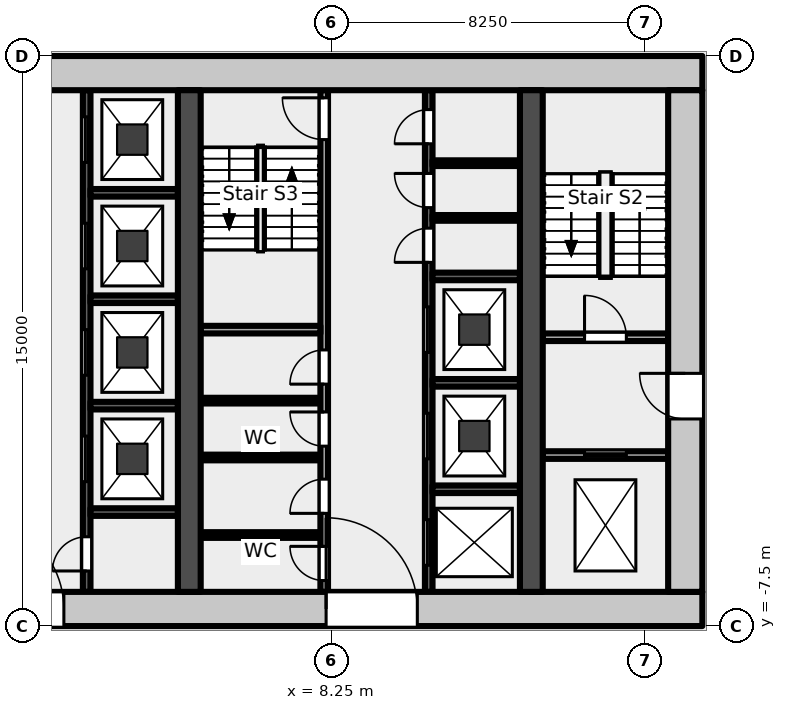
"""IFC4 building model, lengths in metres.
Left out: names, types, materials, properties, quantities, classifications, styles, units other than length and angle.
Written with IfcOpenShell. Run it as: python <this file> out.ifc"""

import sys

from ifc_helpers import new_model, si_unit, direction, frame, frame_2d, origin, place, context, subcontext, project, spatial, rectangle, extrude, element, fill, save


model = new_model("IFC4")
c1 = context("Model", 3, precision=1e-05, world=origin(), true_north=direction((0.0, 1.0)))
c2 = subcontext(c1, "Body", "Model", "MODEL_VIEW")
j1 = project(units=[si_unit("LENGTHUNIT", "METRE"), si_unit("PLANEANGLEUNIT", "RADIAN")], contexts=[c1])
p1 = place(None, origin())
s1 = spatial("IfcSite", under=j1, at=p1, CompositionType="ELEMENT")
p2 = place(p1, origin())
s2 = spatial("IfcBuilding", under=s1, at=p2, CompositionType="ELEMENT")
p3 = place(p2, origin())
s3 = spatial("IfcBuildingStorey", under=s2, at=p3, CompositionType="ELEMENT", Elevation=0.0)
p4 = place(p3, frame((-18.0, -7.05, -0.2), z_axis=(0.0, 0.0, 1.0), x_axis=(1.0, 0.0, 0.0)))
e1 = element("IfcWall", 1, at=p4, inside=s3, PredefinedType="SHEAR", context=c2, shape_type="SweptSolid", body=[
    extrude(rectangle(XDim=36.0, YDim=0.9, at=frame_2d((18.0, 0.0))), origin(), (0.0, 0.0, 1.0), 7.2),
])
p5 = place(p4, frame((7.8, 0.0, 0.2)))
e2 = element("IfcOpeningElement", 2, at=p5, cuts=e1, PredefinedType="OPENING", context=c2, shape_type="SweptSolid", body=[
    extrude(rectangle(XDim=2.4, YDim=2.1, at=frame_2d((1.2, 1.05))), frame((0.0, 0.46, 0.0), z_axis=(0.0, -1.0, 0.0), x_axis=(1.0, 0.0, 0.0)), (0.0, 0.0, 1.0), 0.921),
])
p6 = place(p4, frame((16.8, 0.0, 0.2)))
e3 = element("IfcOpeningElement", 3, at=p6, cuts=e1, PredefinedType="OPENING", context=c2, shape_type="SweptSolid", body=[
    extrude(rectangle(XDim=2.4, YDim=2.1, at=frame_2d((1.2, 1.05))), frame((0.0, 0.46, 0.0), z_axis=(0.0, -1.0, 0.0), x_axis=(1.0, 0.0, 0.0)), (0.0, 0.0, 1.0), 0.921),
])
p7 = place(p4, frame((26.1, 0.0, 0.2)))
e4 = element("IfcOpeningElement", 4, at=p7, cuts=e1, PredefinedType="OPENING", context=c2, shape_type="SweptSolid", body=[
    extrude(rectangle(XDim=2.4, YDim=2.1, at=frame_2d((1.2, 1.05))), frame((0.0, 0.46, 0.0), z_axis=(0.0, -1.0, 0.0), x_axis=(1.0, 0.0, 0.0)), (0.0, 0.0, 1.0), 0.921),
])
p8 = place(p3, frame((-18.0, 7.05, -0.2), z_axis=(0.0, 0.0, 1.0), x_axis=(1.0, 0.0, 0.0)))
e5 = element("IfcWall", 5, at=p8, inside=s3, PredefinedType="SHEAR", context=c2, shape_type="SweptSolid", body=[
    extrude(rectangle(XDim=36.0, YDim=0.9, at=frame_2d((18.0, 0.0))), origin(), (0.0, 0.0, 1.0), 7.2),
])
p9 = place(p3, frame((17.55, -6.6, -0.2), z_axis=(0.0, 0.0, 1.0), x_axis=(0.0, 1.0, 0.0)))
e6 = element("IfcWall", 6, at=p9, inside=s3, PredefinedType="SHEAR", context=c2, shape_type="SweptSolid", body=[
    extrude(rectangle(XDim=13.2, YDim=0.9, at=frame_2d((6.6, 0.0))), origin(), (0.0, 0.0, 1.0), 7.2),
])
p10 = place(p9, frame((4.55, 0.0, 0.2)))
e7 = element("IfcOpeningElement", 7, at=p10, cuts=e6, PredefinedType="OPENING", context=c2, shape_type="SweptSolid", body=[
    extrude(rectangle(XDim=1.2, YDim=2.1, at=frame_2d((0.6, 1.05))), frame((0.0, 0.46, 0.0), z_axis=(0.0, -1.0, 0.0), x_axis=(1.0, 0.0, 0.0)), (0.0, 0.0, 1.0), 0.921),
])
for number, where, z_axis, x_axis in (
    (8, (4.5, -6.6, -0.2), (0.0, 0.0, 1.0), (0.0, 1.0, 0.0)),
    (9, (13.5, -6.6, -0.2), (0.0, 0.0, 1.0), (0.0, 1.0, 0.0)),
):
    element("IfcWall", number, at=place(p3, frame(where, z_axis=z_axis, x_axis=x_axis)), inside=s3, PredefinedType="SHEAR", context=c2, shape_type="SweptSolid", body=[
        extrude(rectangle(XDim=13.2, YDim=0.6, at=frame_2d((6.6, 0.0))), origin(), (0.0, 0.0, 1.0), 7.2),
    ])
p11 = place(p3, frame((13.8, -3.0, 0.0), z_axis=(0.0, 0.0, 1.0), x_axis=(1.0, 0.0, 0.0)))
e10 = element("IfcWall", 10, at=p11, inside=s3, PredefinedType="PARTITIONING", context=c2, shape_type="SweptSolid", body=[
    extrude(rectangle(XDim=3.3, YDim=0.2, at=frame_2d((1.65, 0.0))), origin(), (0.0, 0.0, 1.0), 7.0),
])
p12 = place(p11, frame((1.1, 0.0, 0.0)))
e11 = element("IfcOpeningElement", 11, at=p12, cuts=e10, PredefinedType="OPENING", context=c2, shape_type="SweptSolid", body=[
    extrude(rectangle(XDim=1.1, YDim=2.1, at=frame_2d((0.55, 1.05))), frame((0.0, 0.111, 0.0), z_axis=(0.0, -1.0, 0.0), x_axis=(1.0, 0.0, 0.0)), (0.0, 0.0, 1.0), 0.221),
])
p13 = place(p3, frame((13.8, 0.1, 0.0), z_axis=(0.0, 0.0, 1.0), x_axis=(1.0, 0.0, 0.0)))
e12 = element("IfcWall", 12, at=p13, inside=s3, PredefinedType="PARTITIONING", context=c2, shape_type="SweptSolid", body=[
    extrude(rectangle(XDim=3.3, YDim=0.2, at=frame_2d((1.65, 0.0))), origin(), (0.0, 0.0, 1.0), 7.0),
])
p14 = place(p13, frame((1.1, 0.0, 0.0)))
e13 = element("IfcOpeningElement", 13, at=p14, cuts=e12, PredefinedType="OPENING", context=c2, shape_type="SweptSolid", body=[
    extrude(rectangle(XDim=1.1, YDim=2.1, at=frame_2d((0.55, 1.05))), frame((0.0, 0.111, 0.0), z_axis=(0.0, -1.0, 0.0), x_axis=(1.0, 0.0, 0.0)), (0.0, 0.0, 1.0), 0.221),
])
p15 = place(p3, frame((1.8, -6.6, 0.0), z_axis=(0.0, 0.0, 1.0), x_axis=(0.0, 1.0, 0.0)))
e14 = element("IfcWall", 14, at=p15, inside=s3, PredefinedType="PARTITIONING", context=c2, shape_type="SweptSolid", body=[
    extrude(rectangle(XDim=13.2, YDim=0.2, at=frame_2d((6.6, 0.0))), origin(), (0.0, 0.0, 1.0), 7.0),
])
p16 = place(p15, frame((0.55, 0.0, 0.0)))
e15 = element("IfcOpeningElement", 15, at=p16, cuts=e14, PredefinedType="OPENING", context=c2, shape_type="SweptSolid", body=[
    extrude(rectangle(XDim=0.9, YDim=2.1, at=frame_2d((0.45, 1.05))), frame((0.0, 0.111, 0.0), z_axis=(0.0, -1.0, 0.0), x_axis=(1.0, 0.0, 0.0)), (0.0, 0.0, 1.0), 0.221),
])
p17 = place(p15, frame((2.9, 0.0, 0.0)))
e16 = element("IfcOpeningElement", 16, at=p17, cuts=e14, PredefinedType="OPENING", context=c2, shape_type="SweptSolid", body=[
    extrude(rectangle(XDim=1.2, YDim=2.1, at=frame_2d((0.6, 1.05))), frame((0.0, 0.111, 0.0), z_axis=(0.0, -1.0, 0.0), x_axis=(1.0, 0.0, 0.0)), (0.0, 0.0, 1.0), 0.221),
])
p18 = place(p15, frame((5.7, 0.0, 0.0)))
e17 = element("IfcOpeningElement", 17, at=p18, cuts=e14, PredefinedType="OPENING", context=c2, shape_type="SweptSolid", body=[
    extrude(rectangle(XDim=1.2, YDim=2.1, at=frame_2d((0.6, 1.05))), frame((0.0, 0.111, 0.0), z_axis=(0.0, -1.0, 0.0), x_axis=(1.0, 0.0, 0.0)), (0.0, 0.0, 1.0), 0.221),
])
p19 = place(p15, frame((8.5, 0.0, 0.0)))
e18 = element("IfcOpeningElement", 18, at=p19, cuts=e14, PredefinedType="OPENING", context=c2, shape_type="SweptSolid", body=[
    extrude(rectangle(XDim=1.2, YDim=2.1, at=frame_2d((0.6, 1.05))), frame((0.0, 0.111, 0.0), z_axis=(0.0, -1.0, 0.0), x_axis=(1.0, 0.0, 0.0)), (0.0, 0.0, 1.0), 0.221),
])
p20 = place(p15, frame((11.3, 0.0, 0.0)))
e19 = element("IfcOpeningElement", 19, at=p20, cuts=e14, PredefinedType="OPENING", context=c2, shape_type="SweptSolid", body=[
    extrude(rectangle(XDim=1.2, YDim=2.1, at=frame_2d((0.6, 1.05))), frame((0.0, 0.111, 0.0), z_axis=(0.0, -1.0, 0.0), x_axis=(1.0, 0.0, 0.0)), (0.0, 0.0, 1.0), 0.221),
])
for number, where, z_axis, x_axis in (
    (20, (1.9, -1.7, 0.0), (0.0, 0.0, 1.0), (1.0, 0.0, 0.0)),
    (21, (1.9, 1.1, 0.0), (0.0, 0.0, 1.0), (1.0, 0.0, 0.0)),
    (22, (1.9, 3.9, 0.0), (0.0, 0.0, 1.0), (1.0, 0.0, 0.0)),
    (23, (1.9, -4.5, 0.0), (0.0, 0.0, 1.0), (1.0, 0.0, 0.0)),
):
    element("IfcWall", number, at=place(p3, frame(where, z_axis=z_axis, x_axis=x_axis)), inside=s3, PredefinedType="PARTITIONING", context=c2, shape_type="SweptSolid", body=[
        extrude(rectangle(XDim=2.3, YDim=0.2, at=frame_2d((1.15, 0.0))), origin(), (0.0, 0.0, 1.0), 7.0),
    ])
p21 = place(p3, frame((8.05, -6.6, 0.0), z_axis=(0.0, 0.0, 1.0), x_axis=(0.0, 1.0, 0.0)))
e24 = element("IfcWall", 24, at=p21, inside=s3, PredefinedType="PARTITIONING", context=c2, shape_type="SweptSolid", body=[
    extrude(rectangle(XDim=13.2, YDim=0.2, at=frame_2d((6.6, 0.0))), origin(), (0.0, 0.0, 1.0), 7.0),
])
p22 = place(p21, frame((0.298, 0.0, 0.0)))
e25 = element("IfcOpeningElement", 25, at=p22, cuts=e24, PredefinedType="OPENING", context=c2, shape_type="SweptSolid", body=[
    extrude(rectangle(XDim=0.9, YDim=2.1, at=frame_2d((0.45, 1.05))), frame((0.0, 0.111, 0.0), z_axis=(0.0, -1.0, 0.0), x_axis=(1.0, 0.0, 0.0)), (0.0, 0.0, 1.0), 0.221),
])
p23 = place(p21, frame((2.066, 0.0, 0.0)))
e26 = element("IfcOpeningElement", 26, at=p23, cuts=e24, PredefinedType="OPENING", context=c2, shape_type="SweptSolid", body=[
    extrude(rectangle(XDim=0.9, YDim=2.1, at=frame_2d((0.45, 1.05))), frame((0.0, 0.111, 0.0), z_axis=(0.0, -1.0, 0.0), x_axis=(1.0, 0.0, 0.0)), (0.0, 0.0, 1.0), 0.221),
])
p24 = place(p21, frame((3.834, 0.0, 0.0)))
e27 = element("IfcOpeningElement", 27, at=p24, cuts=e24, PredefinedType="OPENING", context=c2, shape_type="SweptSolid", body=[
    extrude(rectangle(XDim=0.9, YDim=2.1, at=frame_2d((0.45, 1.05))), frame((0.0, 0.111, 0.0), z_axis=(0.0, -1.0, 0.0), x_axis=(1.0, 0.0, 0.0)), (0.0, 0.0, 1.0), 0.221),
])
p25 = place(p21, frame((5.466, 0.0, 0.0)))
e28 = element("IfcOpeningElement", 28, at=p25, cuts=e24, PredefinedType="OPENING", context=c2, shape_type="SweptSolid", body=[
    extrude(rectangle(XDim=0.9, YDim=2.1, at=frame_2d((0.45, 1.05))), frame((0.0, 0.111, 0.0), z_axis=(0.0, -1.0, 0.0), x_axis=(1.0, 0.0, 0.0)), (0.0, 0.0, 1.0), 0.221),
])
p26 = place(p21, frame((11.9, 0.0, 0.0)))
e29 = element("IfcOpeningElement", 29, at=p26, cuts=e24, PredefinedType="OPENING", context=c2, shape_type="SweptSolid", body=[
    extrude(rectangle(XDim=1.1, YDim=2.1, at=frame_2d((0.55, 1.05))), frame((0.0, 0.111, 0.0), z_axis=(0.0, -1.0, 0.0), x_axis=(1.0, 0.0, 0.0)), (0.0, 0.0, 1.0), 0.221),
])
p27 = place(p3, frame((10.8, -6.6, 0.0), z_axis=(0.0, 0.0, 1.0), x_axis=(0.0, 1.0, 0.0)))
e30 = element("IfcWall", 30, at=p27, inside=s3, PredefinedType="PARTITIONING", context=c2, shape_type="SweptSolid", body=[
    extrude(rectangle(XDim=13.2, YDim=0.2, at=frame_2d((6.6, 0.0))), origin(), (0.0, 0.0, 1.0), 7.0),
])
p28 = place(p27, frame((0.7, 0.0, 0.0)))
e31 = element("IfcOpeningElement", 31, at=p28, cuts=e30, PredefinedType="OPENING", context=c2, shape_type="SweptSolid", body=[
    extrude(rectangle(XDim=1.2, YDim=2.1, at=frame_2d((0.6, 1.05))), frame((0.0, 0.111, 0.0), z_axis=(0.0, -1.0, 0.0), x_axis=(1.0, 0.0, 0.0)), (0.0, 0.0, 1.0), 0.221),
])
p29 = place(p27, frame((3.5, 0.0, 0.0)))
e32 = element("IfcOpeningElement", 32, at=p29, cuts=e30, PredefinedType="OPENING", context=c2, shape_type="SweptSolid", body=[
    extrude(rectangle(XDim=1.2, YDim=2.1, at=frame_2d((0.6, 1.05))), frame((0.0, 0.111, 0.0), z_axis=(0.0, -1.0, 0.0), x_axis=(1.0, 0.0, 0.0)), (0.0, 0.0, 1.0), 0.221),
])
p30 = place(p27, frame((6.3, 0.0, 0.0)))
e33 = element("IfcOpeningElement", 33, at=p30, cuts=e30, PredefinedType="OPENING", context=c2, shape_type="SweptSolid", body=[
    extrude(rectangle(XDim=1.2, YDim=2.1, at=frame_2d((0.6, 1.05))), frame((0.0, 0.111, 0.0), z_axis=(0.0, -1.0, 0.0), x_axis=(1.0, 0.0, 0.0)), (0.0, 0.0, 1.0), 0.221),
])
p31 = place(p27, frame((8.67, 0.0, 0.0)))
e34 = element("IfcOpeningElement", 34, at=p31, cuts=e30, PredefinedType="OPENING", context=c2, shape_type="SweptSolid", body=[
    extrude(rectangle(XDim=0.9, YDim=2.1, at=frame_2d((0.45, 1.05))), frame((0.0, 0.111, 0.0), z_axis=(0.0, -1.0, 0.0), x_axis=(1.0, 0.0, 0.0)), (0.0, 0.0, 1.0), 0.221),
])
p32 = place(p27, frame((10.11, 0.0, 0.0)))
e35 = element("IfcOpeningElement", 35, at=p32, cuts=e30, PredefinedType="OPENING", context=c2, shape_type="SweptSolid", body=[
    extrude(rectangle(XDim=0.9, YDim=2.1, at=frame_2d((0.45, 1.05))), frame((0.0, 0.111, 0.0), z_axis=(0.0, -1.0, 0.0), x_axis=(1.0, 0.0, 0.0)), (0.0, 0.0, 1.0), 0.221),
])
p33 = place(p27, frame((11.79, 0.0, 0.0)))
e36 = element("IfcOpeningElement", 36, at=p33, cuts=e30, PredefinedType="OPENING", context=c2, shape_type="SweptSolid", body=[
    extrude(rectangle(XDim=0.9, YDim=2.1, at=frame_2d((0.45, 1.05))), frame((0.0, 0.111, 0.0), z_axis=(0.0, -1.0, 0.0), x_axis=(1.0, 0.0, 0.0)), (0.0, 0.0, 1.0), 0.221),
])
p34 = place(p3, frame((4.8, 0.3, 0.0), z_axis=(0.0, 0.0, 1.0), x_axis=(1.0, 0.0, 0.0)))
e37 = element("IfcWall", 37, at=p34, inside=s3, PredefinedType="PARTITIONING", context=c2, shape_type="SweptSolid", body=[
    extrude(rectangle(XDim=3.15, YDim=0.2, at=frame_2d((1.575, 0.0))), origin(), (0.0, 0.0, 1.0), 7.0),
])
for number, where, z_axis, x_axis in (
    (38, (4.8, -5.104, 0.0), (0.0, 0.0, 1.0), (1.0, 0.0, 0.0)),
    (39, (4.8, -3.064, 0.0), (0.0, 0.0, 1.0), (1.0, 0.0, 0.0)),
    (40, (4.8, -1.568, 0.0), (0.0, 0.0, 1.0), (1.0, 0.0, 0.0)),
):
    element("IfcWall", number, at=place(p3, frame(where, z_axis=z_axis, x_axis=x_axis)), inside=s3, PredefinedType="PARTITIONING", context=c2, shape_type="SweptSolid", body=[
        extrude(rectangle(XDim=3.15, YDim=0.15, at=frame_2d((1.575, 0.0))), origin(), (0.0, 0.0, 1.0), 7.0),
    ])
for number, where, z_axis, x_axis in (
    (41, (10.9, -3.9, 0.0), (0.0, 0.0, 1.0), (1.0, 0.0, 0.0)),
    (42, (10.9, -1.1, 0.0), (0.0, 0.0, 1.0), (1.0, 0.0, 0.0)),
    (43, (10.9, 1.7, 0.0), (0.0, 0.0, 1.0), (1.0, 0.0, 0.0)),
):
    element("IfcWall", number, at=place(p3, frame(where, z_axis=z_axis, x_axis=x_axis)), inside=s3, PredefinedType="PARTITIONING", context=c2, shape_type="SweptSolid", body=[
        extrude(rectangle(XDim=2.3, YDim=0.2, at=frame_2d((1.15, 0.0))), origin(), (0.0, 0.0, 1.0), 7.0),
    ])
for number, where, z_axis, x_axis in (
    (44, (10.9, 3.24, 0.0), (0.0, 0.0, 1.0), (1.0, 0.0, 0.0)),
    (45, (10.9, 4.68, 0.0), (0.0, 0.0, 1.0), (1.0, 0.0, 0.0)),
):
    element("IfcWall", number, at=place(p3, frame(where, z_axis=z_axis, x_axis=x_axis)), inside=s3, PredefinedType="PARTITIONING", context=c2, shape_type="SweptSolid", body=[
        extrude(rectangle(XDim=2.3, YDim=0.15, at=frame_2d((1.15, 0.0))), origin(), (0.0, 0.0, 1.0), 7.0),
    ])
p35 = place(p12, origin())
e46 = element("IfcDoor", 46, at=p35, inside=s3, OperationType="DOUBLE_DOOR_SLIDING", PredefinedType="DOOR", context=c2, shape_type="SweptSolid", body=[
    extrude(rectangle(XDim=1.1, YDim=2.1, at=frame_2d((0.55, 1.05))), frame((0.0, 0.025, 0.0), z_axis=(0.0, -1.0, 0.0), x_axis=(1.0, 0.0, 0.0)), (0.0, 0.0, 1.0), 0.05),
])
fill(e11, e46)
p36 = place(p10, origin())
e47 = element("IfcDoor", 47, at=p36, inside=s3, OperationType="SINGLE_SWING_RIGHT", PredefinedType="DOOR", context=c2, shape_type="SweptSolid", body=[
    extrude(rectangle(XDim=1.2, YDim=2.1, at=frame_2d((0.6, 1.05))), frame((0.0, 0.025, 0.0), z_axis=(0.0, -1.0, 0.0), x_axis=(1.0, 0.0, 0.0)), (0.0, 0.0, 1.0), 0.05),
])
fill(e7, e47)
p37 = place(p14, origin())
e48 = element("IfcDoor", 48, at=p37, inside=s3, OperationType="SINGLE_SWING_LEFT", PredefinedType="DOOR", context=c2, shape_type="SweptSolid", body=[
    extrude(rectangle(XDim=1.1, YDim=2.1, at=frame_2d((0.55, 1.05))), frame((0.0, 0.025, 0.0), z_axis=(0.0, -1.0, 0.0), x_axis=(1.0, 0.0, 0.0)), (0.0, 0.0, 1.0), 0.05),
])
fill(e13, e48)
p38 = place(p16, origin())
e49 = element("IfcDoor", 49, at=p38, inside=s3, OperationType="SINGLE_SWING_LEFT", PredefinedType="DOOR", context=c2, shape_type="SweptSolid", body=[
    extrude(rectangle(XDim=0.9, YDim=2.1, at=frame_2d((0.45, 1.05))), frame((0.0, 0.025, 0.0), z_axis=(0.0, -1.0, 0.0), x_axis=(1.0, 0.0, 0.0)), (0.0, 0.0, 1.0), 0.05),
])
fill(e15, e49)
p39 = place(p17, origin())
e50 = element("IfcDoor", 50, at=p39, inside=s3, OperationType="DOUBLE_DOOR_SLIDING", PredefinedType="DOOR", context=c2, shape_type="SweptSolid", body=[
    extrude(rectangle(XDim=1.2, YDim=2.1, at=frame_2d((0.6, 1.05))), frame((0.0, 0.025, 0.0), z_axis=(0.0, -1.0, 0.0), x_axis=(1.0, 0.0, 0.0)), (0.0, 0.0, 1.0), 0.05),
])
fill(e16, e50)
p40 = place(p18, origin())
e51 = element("IfcDoor", 51, at=p40, inside=s3, OperationType="DOUBLE_DOOR_SLIDING", PredefinedType="DOOR", context=c2, shape_type="SweptSolid", body=[
    extrude(rectangle(XDim=1.2, YDim=2.1, at=frame_2d((0.6, 1.05))), frame((0.0, 0.025, 0.0), z_axis=(0.0, -1.0, 0.0), x_axis=(1.0, 0.0, 0.0)), (0.0, 0.0, 1.0), 0.05),
])
fill(e17, e51)
p41 = place(p19, origin())
e52 = element("IfcDoor", 52, at=p41, inside=s3, OperationType="DOUBLE_DOOR_SLIDING", PredefinedType="DOOR", context=c2, shape_type="SweptSolid", body=[
    extrude(rectangle(XDim=1.2, YDim=2.1, at=frame_2d((0.6, 1.05))), frame((0.0, 0.025, 0.0), z_axis=(0.0, -1.0, 0.0), x_axis=(1.0, 0.0, 0.0)), (0.0, 0.0, 1.0), 0.05),
])
fill(e18, e52)
p42 = place(p20, origin())
e53 = element("IfcDoor", 53, at=p42, inside=s3, OperationType="DOUBLE_DOOR_SLIDING", PredefinedType="DOOR", context=c2, shape_type="SweptSolid", body=[
    extrude(rectangle(XDim=1.2, YDim=2.1, at=frame_2d((0.6, 1.05))), frame((0.0, 0.025, 0.0), z_axis=(0.0, -1.0, 0.0), x_axis=(1.0, 0.0, 0.0)), (0.0, 0.0, 1.0), 0.05),
])
fill(e19, e53)
p43 = place(p6, origin())
e54 = element("IfcDoor", 54, at=p43, inside=s3, OperationType="DOUBLE_DOOR_DOUBLE_SWING", PredefinedType="DOOR", context=c2, shape_type="SweptSolid", body=[
    extrude(rectangle(XDim=2.4, YDim=2.1, at=frame_2d((1.2, 1.05))), frame((0.0, 0.025, 0.0), z_axis=(0.0, -1.0, 0.0), x_axis=(1.0, 0.0, 0.0)), (0.0, 0.0, 1.0), 0.05),
])
fill(e3, e54)
p44 = place(p22, origin())
e55 = element("IfcDoor", 55, at=p44, inside=s3, OperationType="SINGLE_SWING_RIGHT", PredefinedType="DOOR", context=c2, shape_type="SweptSolid", body=[
    extrude(rectangle(XDim=0.9, YDim=2.1, at=frame_2d((0.45, 1.05))), frame((0.0, 0.025, 0.0), z_axis=(0.0, -1.0, 0.0), x_axis=(1.0, 0.0, 0.0)), (0.0, 0.0, 1.0), 0.05),
])
fill(e25, e55)
p45 = place(p23, origin())
e56 = element("IfcDoor", 56, at=p45, inside=s3, OperationType="SINGLE_SWING_LEFT", PredefinedType="DOOR", context=c2, shape_type="SweptSolid", body=[
    extrude(rectangle(XDim=0.9, YDim=2.1, at=frame_2d((0.45, 1.05))), frame((0.0, 0.025, 0.0), z_axis=(0.0, -1.0, 0.0), x_axis=(1.0, 0.0, 0.0)), (0.0, 0.0, 1.0), 0.05),
])
fill(e26, e56)
p46 = place(p24, origin())
e57 = element("IfcDoor", 57, at=p46, inside=s3, OperationType="SINGLE_SWING_RIGHT", PredefinedType="DOOR", context=c2, shape_type="SweptSolid", body=[
    extrude(rectangle(XDim=0.9, YDim=2.1, at=frame_2d((0.45, 1.05))), frame((0.0, 0.025, 0.0), z_axis=(0.0, -1.0, 0.0), x_axis=(1.0, 0.0, 0.0)), (0.0, 0.0, 1.0), 0.05),
])
fill(e27, e57)
p47 = place(p25, origin())
e58 = element("IfcDoor", 58, at=p47, inside=s3, OperationType="SINGLE_SWING_LEFT", PredefinedType="DOOR", context=c2, shape_type="SweptSolid", body=[
    extrude(rectangle(XDim=0.9, YDim=2.1, at=frame_2d((0.45, 1.05))), frame((0.0, 0.025, 0.0), z_axis=(0.0, -1.0, 0.0), x_axis=(1.0, 0.0, 0.0)), (0.0, 0.0, 1.0), 0.05),
])
fill(e28, e58)
p48 = place(p26, origin())
e59 = element("IfcDoor", 59, at=p48, inside=s3, OperationType="SINGLE_SWING_RIGHT", PredefinedType="DOOR", context=c2, shape_type="SweptSolid", body=[
    extrude(rectangle(XDim=1.1, YDim=2.1, at=frame_2d((0.55, 1.05))), frame((0.0, 0.025, 0.0), z_axis=(0.0, -1.0, 0.0), x_axis=(1.0, 0.0, 0.0)), (0.0, 0.0, 1.0), 0.05),
])
fill(e29, e59)
p49 = place(p7, origin())
e60 = element("IfcDoor", 60, at=p49, inside=s3, OperationType="DOUBLE_DOOR_DOUBLE_SWING", PredefinedType="DOOR", context=c2, shape_type="SweptSolid", body=[
    extrude(rectangle(XDim=2.4, YDim=2.1, at=frame_2d((1.2, 1.05))), frame((0.0, 0.025, 0.0), z_axis=(0.0, -1.0, 0.0), x_axis=(1.0, 0.0, 0.0)), (0.0, 0.0, 1.0), 0.05),
])
fill(e4, e60)
p50 = place(p28, origin())
e61 = element("IfcDoor", 61, at=p50, inside=s3, OperationType="DOUBLE_DOOR_SLIDING", PredefinedType="DOOR", context=c2, shape_type="SweptSolid", body=[
    extrude(rectangle(XDim=1.2, YDim=2.1, at=frame_2d((0.6, 1.05))), frame((0.0, 0.025, 0.0), z_axis=(0.0, -1.0, 0.0), x_axis=(1.0, 0.0, 0.0)), (0.0, 0.0, 1.0), 0.05),
])
fill(e31, e61)
p51 = place(p29, origin())
e62 = element("IfcDoor", 62, at=p51, inside=s3, OperationType="DOUBLE_DOOR_SLIDING", PredefinedType="DOOR", context=c2, shape_type="SweptSolid", body=[
    extrude(rectangle(XDim=1.2, YDim=2.1, at=frame_2d((0.6, 1.05))), frame((0.0, 0.025, 0.0), z_axis=(0.0, -1.0, 0.0), x_axis=(1.0, 0.0, 0.0)), (0.0, 0.0, 1.0), 0.05),
])
fill(e32, e62)
p52 = place(p30, origin())
e63 = element("IfcDoor", 63, at=p52, inside=s3, OperationType="DOUBLE_DOOR_SLIDING", PredefinedType="DOOR", context=c2, shape_type="SweptSolid", body=[
    extrude(rectangle(XDim=1.2, YDim=2.1, at=frame_2d((0.6, 1.05))), frame((0.0, 0.025, 0.0), z_axis=(0.0, -1.0, 0.0), x_axis=(1.0, 0.0, 0.0)), (0.0, 0.0, 1.0), 0.05),
])
fill(e33, e63)
p53 = place(p31, origin())
e64 = element("IfcDoor", 64, at=p53, inside=s3, OperationType="SINGLE_SWING_LEFT", PredefinedType="DOOR", context=c2, shape_type="SweptSolid", body=[
    extrude(rectangle(XDim=0.9, YDim=2.1, at=frame_2d((0.45, 1.05))), frame((0.0, 0.025, 0.0), z_axis=(0.0, -1.0, 0.0), x_axis=(1.0, 0.0, 0.0)), (0.0, 0.0, 1.0), 0.05),
])
fill(e34, e64)
p54 = place(p32, origin())
e65 = element("IfcDoor", 65, at=p54, inside=s3, OperationType="SINGLE_SWING_RIGHT", PredefinedType="DOOR", context=c2, shape_type="SweptSolid", body=[
    extrude(rectangle(XDim=0.9, YDim=2.1, at=frame_2d((0.45, 1.05))), frame((0.0, 0.025, 0.0), z_axis=(0.0, -1.0, 0.0), x_axis=(1.0, 0.0, 0.0)), (0.0, 0.0, 1.0), 0.05),
])
fill(e35, e65)
p55 = place(p33, origin())
e66 = element("IfcDoor", 66, at=p55, inside=s3, OperationType="SINGLE_SWING_LEFT", PredefinedType="DOOR", context=c2, shape_type="SweptSolid", body=[
    extrude(rectangle(XDim=0.9, YDim=2.1, at=frame_2d((0.45, 1.05))), frame((0.0, 0.025, 0.0), z_axis=(0.0, -1.0, 0.0), x_axis=(1.0, 0.0, 0.0)), (0.0, 0.0, 1.0), 0.05),
])
fill(e36, e66)
save(model, sys.argv[1])
